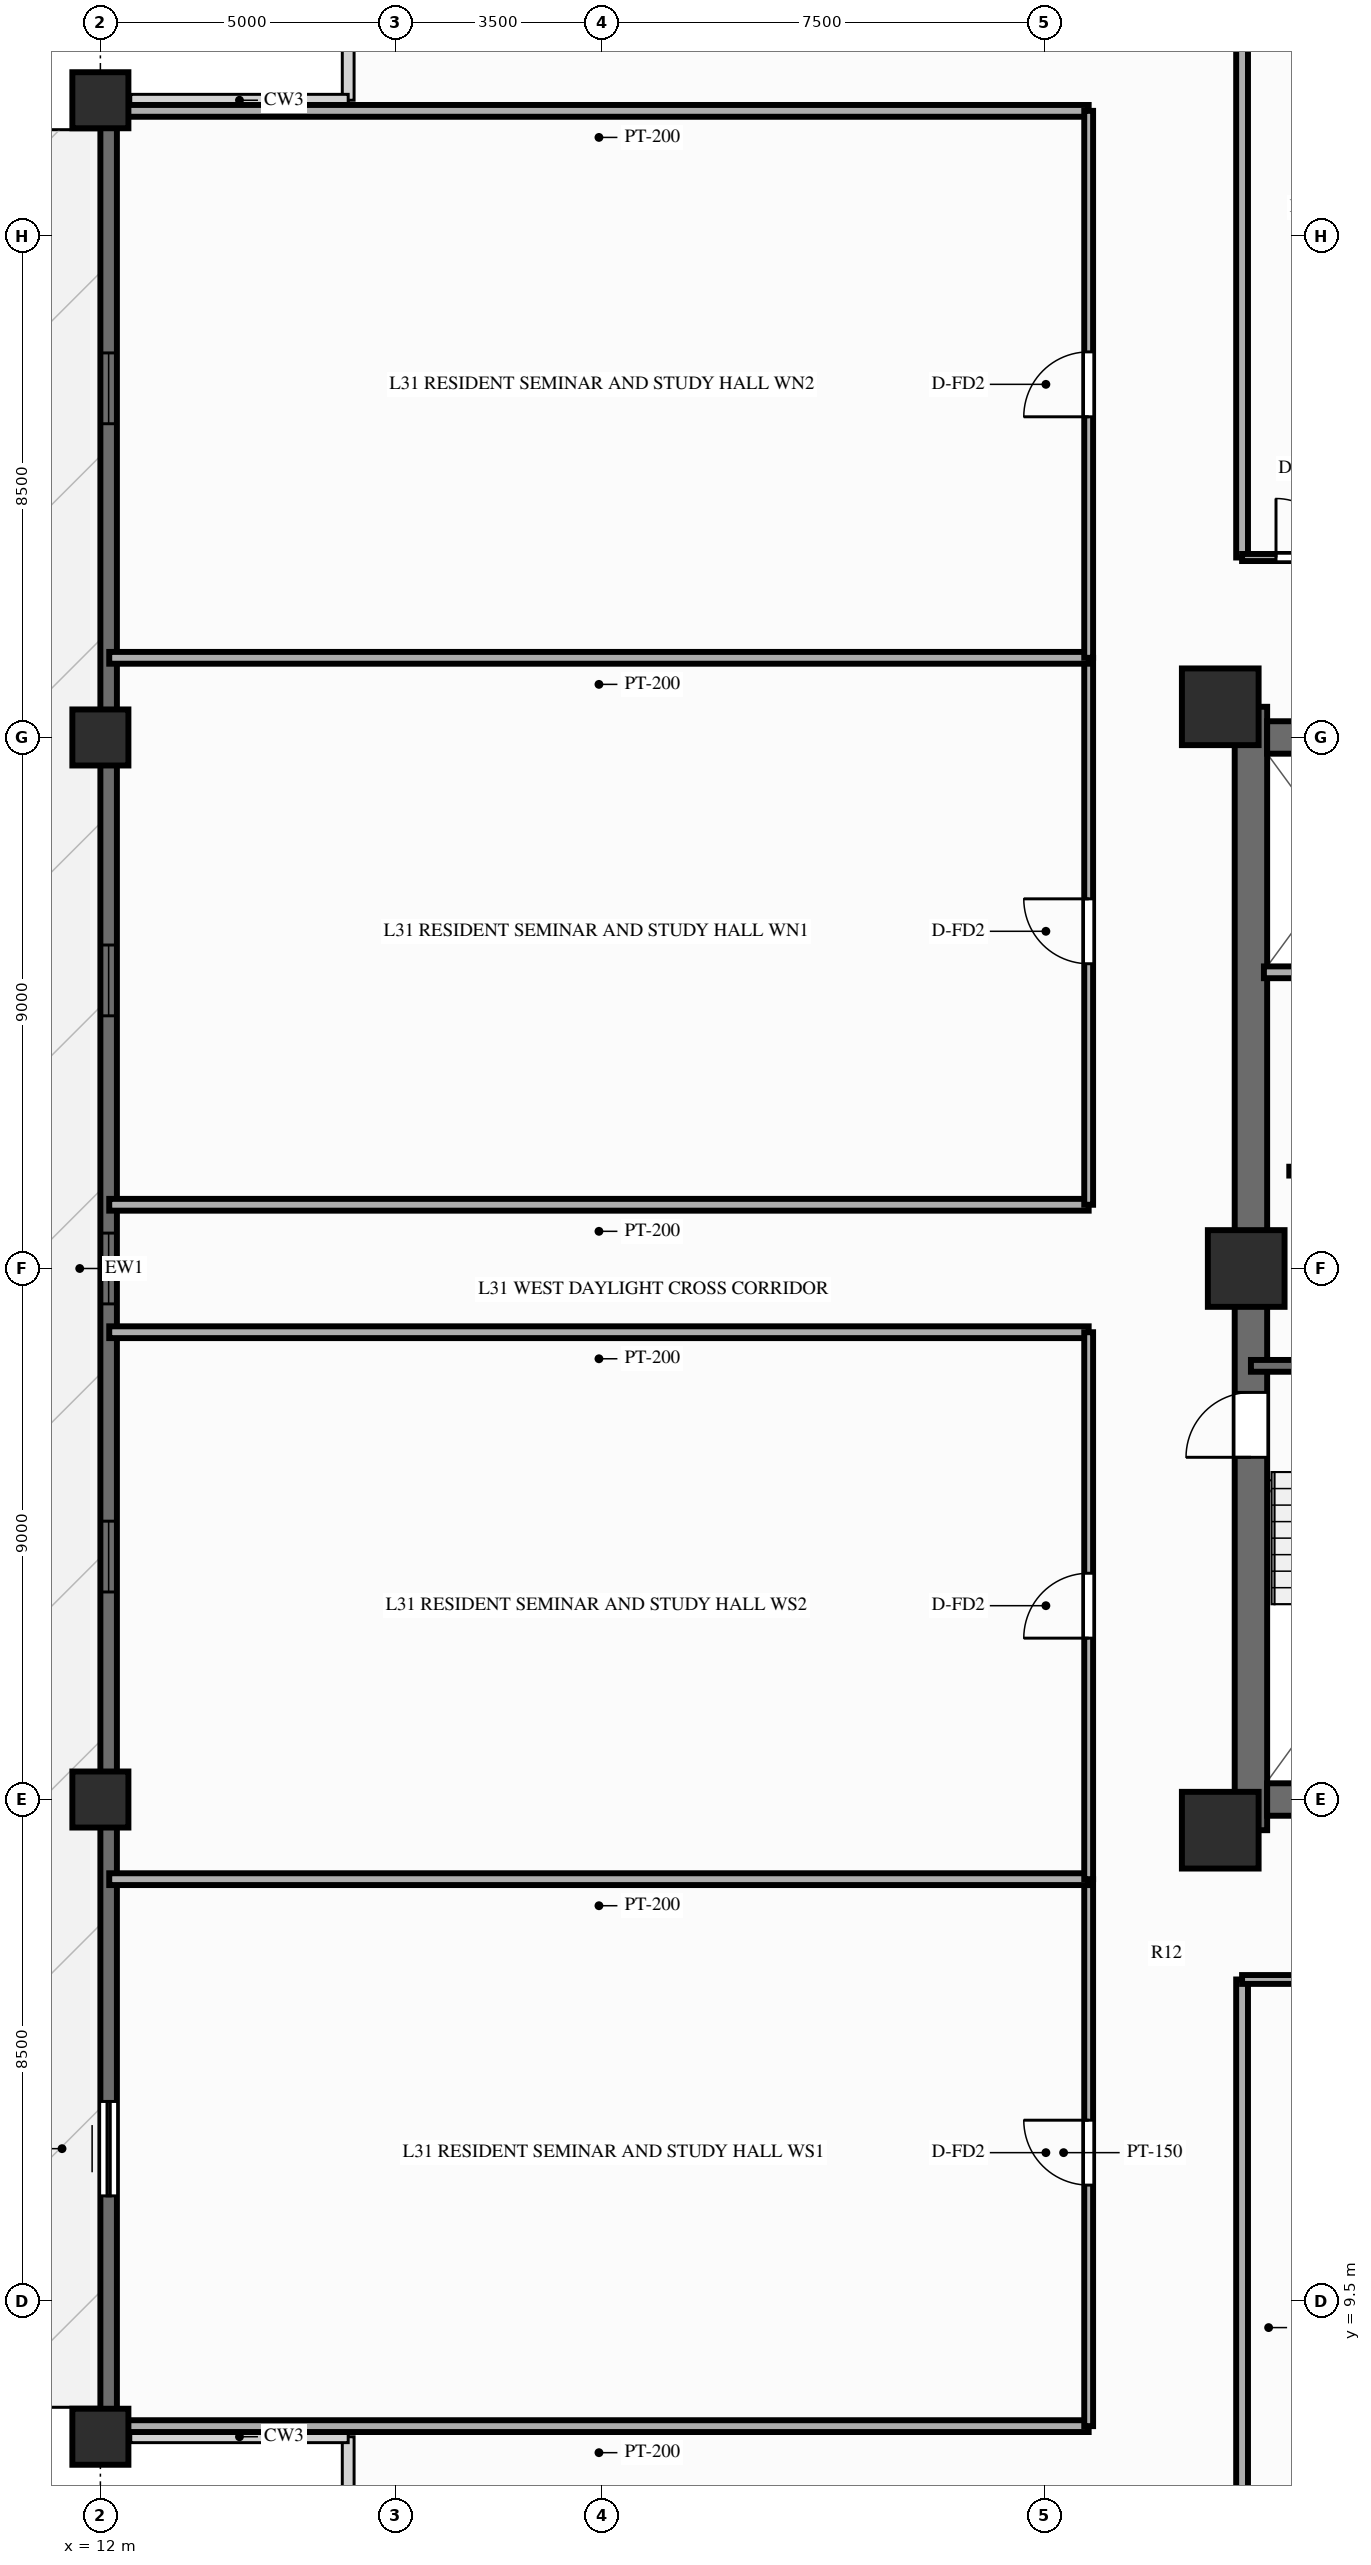
"""IFC4 building model, lengths in metres.
Left out: names, types, materials, properties, quantities, classifications, styles, units other than length and angle.
Written with IfcOpenShell. Run it as: python <this file> out.ifc"""

import sys

from ifc_helpers import new_model, si_unit, direction, frame, frame_2d, origin, origin_2d, place, context, subcontext, project, spatial, rectangle, extrude, source, transform, mapped, element, fill, save


model = new_model("IFC4")
c1 = context("Model", 3, precision=1e-05, world=origin(), true_north=direction((0.0, 1.0)))
c2 = subcontext(c1, "Body", "Model", "MODEL_VIEW")
j1 = project(units=[si_unit("LENGTHUNIT", "METRE"), si_unit("PLANEANGLEUNIT", "RADIAN")], contexts=[c1])
p1 = place(None, origin())
s1 = spatial("IfcSite", under=j1, at=p1, CompositionType="ELEMENT")
p2 = place(p1, origin())
s2 = spatial("IfcBuilding", under=s1, at=p2, CompositionType="ELEMENT")
p3 = place(p2, frame((0.0, 0.0, 98.85)))
s3 = spatial("IfcBuildingStorey", under=s2, at=p3, CompositionType="ELEMENT", Elevation=98.85)
p4 = place(p3, frame((31.5, 17.48, 0.0), z_axis=(0.0, 0.0, 1.0), x_axis=(0.0, 1.0, 0.0)))
e1 = element("IfcWall", 1, at=p4, inside=s3, PredefinedType="SHEAR", context=c2, shape_type="SweptSolid", body=[
    extrude(rectangle(XDim=19.04, YDim=0.55, at=frame_2d((9.52, 0.0))), origin(), (0.0, 0.0, 1.0), 3.0),
])
p5 = place(p4, frame((6.32, 0.0, 0.0)))
e2 = element("IfcOpeningElement", 2, at=p5, cuts=e1, PredefinedType="OPENING", context=c2, shape_type="SweptSolid", body=[
    extrude(rectangle(XDim=1.1, YDim=2.15, at=frame_2d((0.55, 1.075))), frame((0.0, 0.287, 0.0), z_axis=(0.0, -1.0, 0.0), x_axis=(1.0, 0.0, 0.0)), (0.0, 0.0, 1.0), 0.574),
])
p6 = place(p3, frame((31.775, 18.0, 0.0), z_axis=(0.0, 0.0, 1.0), x_axis=(1.0, 0.0, 0.0)))
e3 = element("IfcWall", 3, at=p6, inside=s3, PredefinedType="SHEAR", context=c2, shape_type="SweptSolid", body=[
    extrude(rectangle(XDim=12.45, YDim=0.55, at=frame_2d((6.225, 0.0))), origin(), (0.0, 0.0, 1.0), 3.0),
])
p7 = place(p3, frame((31.775, 36.0, 0.0), z_axis=(0.0, 0.0, 1.0), x_axis=(1.0, 0.0, 0.0)))
e4 = element("IfcWall", 4, at=p7, inside=s3, PredefinedType="SHEAR", context=c2, shape_type="SweptSolid", body=[
    extrude(rectangle(XDim=12.45, YDim=0.55, at=frame_2d((6.225, 0.0))), origin(), (0.0, 0.0, 1.0), 3.0),
])
p8 = place(p7, frame((5.175, 0.0, 0.0), z_axis=(0.0, 0.0, 1.0), x_axis=(-1.0, 0.0, 0.0)))
e5 = element("IfcOpeningElement", 5, at=p8, cuts=e4, PredefinedType="OPENING", context=c2, shape_type="SweptSolid", body=[
    extrude(rectangle(XDim=1.4, YDim=2.15, at=frame_2d((0.7, 1.075))), frame((0.0, 0.287, 0.0), z_axis=(0.0, -1.0, 0.0), x_axis=(1.0, 0.0, 0.0)), (0.0, 0.0, 1.0), 0.574),
])
m1 = source(origin(), c2, "Body", "SweptSolid", [
    extrude(rectangle(XDim=1.3, YDim=1.3, at=origin_2d()), origin(), (0.0, 0.0, 1.0), 3.0),
])
for number, where, z_axis, x_axis in (
    (6, (30.98, 17.48, 0.0), (0.0, 0.0, 1.0), (1.0, 0.0, 0.0)),
    (7, (30.98, 36.52, 0.0), (0.0, 0.0, 1.0), (1.0, 0.0, 0.0)),
    (8, (31.42, 27.0, 0.0), (0.0, 0.0, 1.0), (1.0, 0.0, 0.0)),
):
    element("IfcColumn", number, at=place(p3, frame(where, z_axis=z_axis, x_axis=x_axis)), inside=s3, PredefinedType="COLUMN", context=c2, shape_type="MappedRepresentation", body=[
        mapped(m1, transform((0.0, 0.0, 0.0), scale=1.0)),
    ])
m2 = source(origin(), c2, "Body", "SweptSolid", [
    extrude(rectangle(XDim=0.95, YDim=0.95, at=origin_2d()), origin(), (0.0, 0.0, 1.0), 3.0),
])
for number, where, z_axis, x_axis in (
    (9, (12.0, 46.8, 0.0), (0.0, 0.0, 1.0), (1.0, 0.0, 0.0)),
    (10, (12.0, 36.0, 0.0), (0.0, 0.0, 1.0), (1.0, 0.0, 0.0)),
    (11, (12.0, 18.0, 0.0), (0.0, 0.0, 1.0), (1.0, 0.0, 0.0)),
    (12, (12.0, 7.2, 0.0), (0.0, 0.0, 1.0), (1.0, 0.0, 0.0)),
):
    element("IfcColumn", number, at=place(p3, frame(where, z_axis=z_axis, x_axis=x_axis)), inside=s3, PredefinedType="COLUMN", context=c2, shape_type="MappedRepresentation", body=[
        mapped(m2, transform((0.0, 0.0, 0.0), scale=1.0)),
    ])
p9 = place(p3, frame((12.14, 7.2, 0.0), z_axis=(0.0, 0.0, 1.0), x_axis=(0.0, 1.0, 0.0)))
e13 = element("IfcWall", 13, at=p9, inside=s3, PredefinedType="SOLIDWALL", context=c2, shape_type="SweptSolid", body=[
    extrude(rectangle(XDim=39.6, YDim=0.28, at=frame_2d((19.8, 0.0))), origin(), (0.0, 0.0, 1.0), 2.28),
])
p10 = place(p9, frame((4.083, 0.0, 0.0)))
e14 = element("IfcOpeningElement", 14, at=p10, cuts=e13, PredefinedType="OPENING", context=c2, shape_type="SweptSolid", body=[
    extrude(rectangle(XDim=1.6, YDim=2.15, at=frame_2d((0.8, 1.075))), frame((0.0, 0.152, 0.0), z_axis=(0.0, -1.0, 0.0), x_axis=(1.0, 0.0, 0.0)), (0.0, 0.0, 1.0), 0.304),
])
p11 = place(p9, frame((14.317, 0.0, 0.25)))
e15 = element("IfcOpeningElement", 15, at=p11, cuts=e13, PredefinedType="OPENING", context=c2, shape_type="SweptSolid", body=[
    extrude(rectangle(XDim=1.2, YDim=1.5, at=frame_2d((0.6, 0.75))), frame((0.0, 0.152, 0.0), z_axis=(0.0, -1.0, 0.0), x_axis=(1.0, 0.0, 0.0)), (0.0, 0.0, 1.0), 0.304),
])
p12 = place(p9, frame((19.2, 0.0, 0.25)))
e16 = element("IfcOpeningElement", 16, at=p12, cuts=e13, PredefinedType="OPENING", context=c2, shape_type="SweptSolid", body=[
    extrude(rectangle(XDim=1.2, YDim=1.5, at=frame_2d((0.6, 0.75))), frame((0.0, 0.152, 0.0), z_axis=(0.0, -1.0, 0.0), x_axis=(1.0, 0.0, 0.0)), (0.0, 0.0, 1.0), 0.304),
])
p13 = place(p9, frame((24.083, 0.0, 0.25)))
e17 = element("IfcOpeningElement", 17, at=p13, cuts=e13, PredefinedType="OPENING", context=c2, shape_type="SweptSolid", body=[
    extrude(rectangle(XDim=1.2, YDim=1.5, at=frame_2d((0.6, 0.75))), frame((0.0, 0.152, 0.0), z_axis=(0.0, -1.0, 0.0), x_axis=(1.0, 0.0, 0.0)), (0.0, 0.0, 1.0), 0.304),
])
p14 = place(p9, frame((34.117, 0.0, 0.25)))
e18 = element("IfcOpeningElement", 18, at=p14, cuts=e13, PredefinedType="OPENING", context=c2, shape_type="SweptSolid", body=[
    extrude(rectangle(XDim=1.2, YDim=1.5, at=frame_2d((0.6, 0.75))), frame((0.0, 0.152, 0.0), z_axis=(0.0, -1.0, 0.0), x_axis=(1.0, 0.0, 0.0)), (0.0, 0.0, 1.0), 0.304),
])
p15 = place(p3, frame((32.15, 28.65, 0.0), z_axis=(0.0, 0.0, 1.0), x_axis=(1.0, 0.0, 0.0)))
e19 = element("IfcWall", 19, at=p15, inside=s3, PredefinedType="PARTITIONING", context=c2, shape_type="SweptSolid", body=[
    extrude(rectangle(XDim=2.27, YDim=0.15, at=frame_2d((1.135, 0.0))), origin(), (0.0, 0.0, 1.0), 2.14),
])
p16 = place(p3, frame((31.5, 25.35, 0.0), z_axis=(0.0, 0.0, 1.0), x_axis=(1.0, 0.0, 0.0)))
e20 = element("IfcWall", 20, at=p16, inside=s3, PredefinedType="SOLIDWALL", context=c2, shape_type="SweptSolid", body=[
    extrude(rectangle(XDim=3.93, YDim=0.2, at=frame_2d((1.965, 0.0))), origin(), (0.0, 0.0, 1.0), 2.79),
])
p17 = place(p3, frame((31.72, 32.02, 0.0), z_axis=(0.0, 0.0, 1.0), x_axis=(1.0, 0.0, 0.0)))
e21 = element("IfcWall", 21, at=p17, inside=s3, PredefinedType="PARTITIONING", context=c2, shape_type="SweptSolid", body=[
    extrude(rectangle(XDim=2.8, YDim=0.2, at=frame_2d((1.4, 0.0))), origin(), (0.0, 0.0, 1.0), 2.79),
])
p18 = place(p3, frame((31.35, 14.95, 0.0), z_axis=(0.0, 0.0, 1.0), x_axis=(0.0, -1.0, 0.0)))
e22 = element("IfcWall", 22, at=p18, inside=s3, PredefinedType="PARTITIONING", context=c2, shape_type="SweptSolid", body=[
    extrude(rectangle(XDim=11.8, YDim=0.2, at=frame_2d((5.9, 0.0))), origin(), (0.0, 0.0, 1.0), 2.34),
])
p19 = place(p3, frame((31.35, 14.95, 0.0), z_axis=(0.0, 0.0, 1.0), x_axis=(1.0, 0.0, 0.0)))
e23 = element("IfcWall", 23, at=p19, inside=s3, PredefinedType="PARTITIONING", context=c2, shape_type="SweptSolid", body=[
    extrude(rectangle(XDim=6.384, YDim=0.15, at=frame_2d((3.192, 0.0))), origin(), (0.0, 0.0, 1.0), 2.79),
])
p20 = place(p19, frame((2.642, 0.0, 0.0)))
e24 = element("IfcOpeningElement", 24, at=p20, cuts=e23, PredefinedType="OPENING", context=c2, shape_type="SweptSolid", body=[
    extrude(rectangle(XDim=1.1, YDim=2.15, at=frame_2d((0.55, 1.075))), frame((0.0, 0.087, 0.0), z_axis=(0.0, -1.0, 0.0), x_axis=(1.0, 0.0, 0.0)), (0.0, 0.0, 1.0), 0.174),
])
p21 = place(p3, frame((31.35, 39.05, 0.0), z_axis=(0.0, 0.0, 1.0), x_axis=(0.0, 1.0, 0.0)))
e25 = element("IfcWall", 25, at=p21, inside=s3, PredefinedType="PARTITIONING", context=c2, shape_type="SweptSolid", body=[
    extrude(rectangle(XDim=11.8, YDim=0.2, at=frame_2d((5.9, 0.0))), origin(), (0.0, 0.0, 1.0), 2.34),
])
p22 = place(p3, frame((31.35, 39.05, 0.0), z_axis=(0.0, 0.0, 1.0), x_axis=(1.0, 0.0, 0.0)))
e26 = element("IfcWall", 26, at=p22, inside=s3, PredefinedType="PARTITIONING", context=c2, shape_type="SweptSolid", body=[
    extrude(rectangle(XDim=2.15, YDim=0.12, at=frame_2d((1.075, 0.0))), origin(), (0.0, 0.0, 1.0), 2.79),
])
p23 = place(p22, frame((0.575, 0.0, 0.0)))
e27 = element("IfcOpeningElement", 27, at=p23, cuts=e26, PredefinedType="OPENING", context=c2, shape_type="SweptSolid", body=[
    extrude(rectangle(XDim=1.0, YDim=2.1, at=frame_2d((0.5, 1.05))), frame((0.0, 0.072, 0.0), z_axis=(0.0, -1.0, 0.0), x_axis=(1.0, 0.0, 0.0)), (0.0, 0.0, 1.0), 0.144),
])
for number, where, z_axis, x_axis in (
    (28, (28.75, 7.38, 0.0), (0.0, 0.0, 1.0), (-1.0, 0.0, 0.0)),
    (29, (28.75, 25.92, 0.0), (0.0, 0.0, 1.0), (-1.0, 0.0, 0.0)),
):
    element("IfcWall", number, at=place(p3, frame(where, z_axis=z_axis, x_axis=x_axis)), inside=s3, PredefinedType="PARTITIONING", context=c2, shape_type="SweptSolid", body=[
        extrude(rectangle(XDim=16.6, YDim=0.2, at=frame_2d((8.3, 0.0))), origin(), (0.0, 0.0, 1.0), 2.79),
    ])
p24 = place(p3, frame((28.75, 7.38, 0.0), z_axis=(0.0, 0.0, 1.0), x_axis=(0.0, 1.0, 0.0)))
e30 = element("IfcWall", 30, at=p24, inside=s3, PredefinedType="PARTITIONING", context=c2, shape_type="SweptSolid", body=[
    extrude(rectangle(XDim=9.27, YDim=0.15, at=frame_2d((4.635, 0.0))), origin(), (0.0, 0.0, 1.0), 2.79),
])
p25 = place(p24, frame((4.085, 0.0, 0.0)))
e31 = element("IfcOpeningElement", 31, at=p25, cuts=e30, PredefinedType="OPENING", context=c2, shape_type="SweptSolid", body=[
    extrude(rectangle(XDim=1.1, YDim=2.15, at=frame_2d((0.55, 1.075))), frame((0.0, 0.087, 0.0), z_axis=(0.0, -1.0, 0.0), x_axis=(1.0, 0.0, 0.0)), (0.0, 0.0, 1.0), 0.174),
])
p26 = place(p3, frame((28.75, 16.65, 0.0), z_axis=(0.0, 0.0, 1.0), x_axis=(-1.0, 0.0, 0.0)))
e32 = element("IfcWall", 32, at=p26, inside=s3, PredefinedType="PARTITIONING", context=c2, shape_type="SweptSolid", body=[
    extrude(rectangle(XDim=16.6, YDim=0.2, at=frame_2d((8.3, 0.0))), origin(), (0.0, 0.0, 1.0), 2.79),
])
p27 = place(p3, frame((28.75, 16.65, 0.0), z_axis=(0.0, 0.0, 1.0), x_axis=(0.0, 1.0, 0.0)))
e33 = element("IfcWall", 33, at=p27, inside=s3, PredefinedType="PARTITIONING", context=c2, shape_type="SweptSolid", body=[
    extrude(rectangle(XDim=9.27, YDim=0.15, at=frame_2d((4.635, 0.0))), origin(), (0.0, 0.0, 1.0), 2.79),
])
p28 = place(p27, frame((4.085, 0.0, 0.0)))
e34 = element("IfcOpeningElement", 34, at=p28, cuts=e33, PredefinedType="OPENING", context=c2, shape_type="SweptSolid", body=[
    extrude(rectangle(XDim=1.1, YDim=2.15, at=frame_2d((0.55, 1.075))), frame((0.0, 0.087, 0.0), z_axis=(0.0, -1.0, 0.0), x_axis=(1.0, 0.0, 0.0)), (0.0, 0.0, 1.0), 0.174),
])
for number, where, z_axis, x_axis in (
    (35, (28.75, 28.08, 0.0), (0.0, 0.0, 1.0), (-1.0, 0.0, 0.0)),
    (36, (28.75, 46.62, 0.0), (0.0, 0.0, 1.0), (-1.0, 0.0, 0.0)),
):
    element("IfcWall", number, at=place(p3, frame(where, z_axis=z_axis, x_axis=x_axis)), inside=s3, PredefinedType="PARTITIONING", context=c2, shape_type="SweptSolid", body=[
        extrude(rectangle(XDim=16.6, YDim=0.2, at=frame_2d((8.3, 0.0))), origin(), (0.0, 0.0, 1.0), 2.79),
    ])
p29 = place(p3, frame((28.75, 28.08, 0.0), z_axis=(0.0, 0.0, 1.0), x_axis=(0.0, 1.0, 0.0)))
e37 = element("IfcWall", 37, at=p29, inside=s3, PredefinedType="PARTITIONING", context=c2, shape_type="SweptSolid", body=[
    extrude(rectangle(XDim=9.27, YDim=0.15, at=frame_2d((4.635, 0.0))), origin(), (0.0, 0.0, 1.0), 2.79),
])
p30 = place(p29, frame((4.085, 0.0, 0.0)))
e38 = element("IfcOpeningElement", 38, at=p30, cuts=e37, PredefinedType="OPENING", context=c2, shape_type="SweptSolid", body=[
    extrude(rectangle(XDim=1.1, YDim=2.15, at=frame_2d((0.55, 1.075))), frame((0.0, 0.087, 0.0), z_axis=(0.0, -1.0, 0.0), x_axis=(1.0, 0.0, 0.0)), (0.0, 0.0, 1.0), 0.174),
])
p31 = place(p3, frame((28.75, 37.35, 0.0), z_axis=(0.0, 0.0, 1.0), x_axis=(-1.0, 0.0, 0.0)))
e39 = element("IfcWall", 39, at=p31, inside=s3, PredefinedType="PARTITIONING", context=c2, shape_type="SweptSolid", body=[
    extrude(rectangle(XDim=16.6, YDim=0.2, at=frame_2d((8.3, 0.0))), origin(), (0.0, 0.0, 1.0), 2.79),
])
p32 = place(p3, frame((28.75, 37.35, 0.0), z_axis=(0.0, 0.0, 1.0), x_axis=(0.0, 1.0, 0.0)))
e40 = element("IfcWall", 40, at=p32, inside=s3, PredefinedType="PARTITIONING", context=c2, shape_type="SweptSolid", body=[
    extrude(rectangle(XDim=9.27, YDim=0.15, at=frame_2d((4.635, 0.0))), origin(), (0.0, 0.0, 1.0), 2.79),
])
p33 = place(p32, frame((4.085, 0.0, 0.0)))
e41 = element("IfcOpeningElement", 41, at=p33, cuts=e40, PredefinedType="OPENING", context=c2, shape_type="SweptSolid", body=[
    extrude(rectangle(XDim=1.1, YDim=2.15, at=frame_2d((0.55, 1.075))), frame((0.0, 0.087, 0.0), z_axis=(0.0, -1.0, 0.0), x_axis=(1.0, 0.0, 0.0)), (0.0, 0.0, 1.0), 0.174),
])
m3 = source(origin(), c2, "Body", "SweptSolid", [
    extrude(rectangle(XDim=1.6, YDim=2.15, at=frame_2d((0.8, 1.075))), frame((0.0, 0.025, 0.0), z_axis=(0.0, -1.0, 0.0), x_axis=(1.0, 0.0, 0.0)), (0.0, 0.0, 1.0), 0.05),
])
p34 = place(p10, origin())
e42 = element("IfcDoor", 42, at=p34, inside=s3, OperationType="SLIDING_TO_LEFT", PredefinedType="DOOR", context=c2, shape_type="MappedRepresentation", body=[
    mapped(m3, transform((0.0, 0.0, 0.0), scale=1.0)),
])
fill(e14, e42)
m4 = source(origin(), c2, "Body", "SweptSolid", [
    extrude(rectangle(XDim=1.2, YDim=1.5, at=frame_2d((0.6, 0.75))), frame((0.0, 0.03, 0.0), z_axis=(0.0, -1.0, 0.0), x_axis=(1.0, 0.0, 0.0)), (0.0, 0.0, 1.0), 0.06),
])
p35 = place(p11, origin())
e43 = element("IfcWindow", 43, at=p35, inside=s3, PartitioningType="SINGLE_PANEL", PredefinedType="WINDOW", context=c2, shape_type="MappedRepresentation", body=[
    mapped(m4, transform((0.0, 0.0, 0.0), scale=1.0)),
])
fill(e15, e43)
p36 = place(p12, origin())
e44 = element("IfcWindow", 44, at=p36, inside=s3, PartitioningType="SINGLE_PANEL", PredefinedType="WINDOW", context=c2, shape_type="MappedRepresentation", body=[
    mapped(m4, transform((0.0, 0.0, 0.0), scale=1.0)),
])
fill(e16, e44)
p37 = place(p13, origin())
e45 = element("IfcWindow", 45, at=p37, inside=s3, PartitioningType="SINGLE_PANEL", PredefinedType="WINDOW", context=c2, shape_type="MappedRepresentation", body=[
    mapped(m4, transform((0.0, 0.0, 0.0), scale=1.0)),
])
fill(e17, e45)
p38 = place(p14, origin())
e46 = element("IfcWindow", 46, at=p38, inside=s3, PartitioningType="SINGLE_PANEL", PredefinedType="WINDOW", context=c2, shape_type="MappedRepresentation", body=[
    mapped(m4, transform((0.0, 0.0, 0.0), scale=1.0)),
])
fill(e18, e46)
m5 = source(origin(), c2, "Body", "SweptSolid", [
    extrude(rectangle(XDim=1.1, YDim=2.15, at=frame_2d((0.55, 1.075))), frame((0.0, 0.025, 0.0), z_axis=(0.0, -1.0, 0.0), x_axis=(1.0, 0.0, 0.0)), (0.0, 0.0, 1.0), 0.05),
])
p39 = place(p5, origin())
e47 = element("IfcDoor", 47, at=p39, inside=s3, OperationType="SINGLE_SWING_LEFT", PredefinedType="DOOR", context=c2, shape_type="MappedRepresentation", body=[
    mapped(m5, transform((0.0, 0.0, 0.0), scale=1.0)),
])
fill(e2, e47)
m6 = source(origin(), c2, "Body", "SweptSolid", [
    extrude(rectangle(XDim=1.0, YDim=2.1, at=frame_2d((0.5, 1.05))), frame((0.0, 0.025, 0.0), z_axis=(0.0, -1.0, 0.0), x_axis=(1.0, 0.0, 0.0)), (0.0, 0.0, 1.0), 0.05),
])
p40 = place(p23, origin())
e48 = element("IfcDoor", 48, at=p40, inside=s3, OperationType="SINGLE_SWING_LEFT", PredefinedType="DOOR", context=c2, shape_type="MappedRepresentation", body=[
    mapped(m6, transform((0.0, 0.0, 0.0), scale=1.0)),
])
fill(e27, e48)
p41 = place(p25, origin())
e49 = element("IfcDoor", 49, at=p41, inside=s3, OperationType="SINGLE_SWING_RIGHT", PredefinedType="DOOR", context=c2, shape_type="MappedRepresentation", body=[
    mapped(m5, transform((0.0, 0.0, 0.0), scale=1.0)),
])
fill(e31, e49)
p42 = place(p28, origin())
e50 = element("IfcDoor", 50, at=p42, inside=s3, OperationType="SINGLE_SWING_LEFT", PredefinedType="DOOR", context=c2, shape_type="MappedRepresentation", body=[
    mapped(m5, transform((0.0, 0.0, 0.0), scale=1.0)),
])
fill(e34, e50)
p43 = place(p30, origin())
e51 = element("IfcDoor", 51, at=p43, inside=s3, OperationType="SINGLE_SWING_RIGHT", PredefinedType="DOOR", context=c2, shape_type="MappedRepresentation", body=[
    mapped(m5, transform((0.0, 0.0, 0.0), scale=1.0)),
])
fill(e38, e51)
p44 = place(p33, origin())
e52 = element("IfcDoor", 52, at=p44, inside=s3, OperationType="SINGLE_SWING_LEFT", PredefinedType="DOOR", context=c2, shape_type="MappedRepresentation", body=[
    mapped(m5, transform((0.0, 0.0, 0.0), scale=1.0)),
])
fill(e41, e52)
save(model, sys.argv[1])
